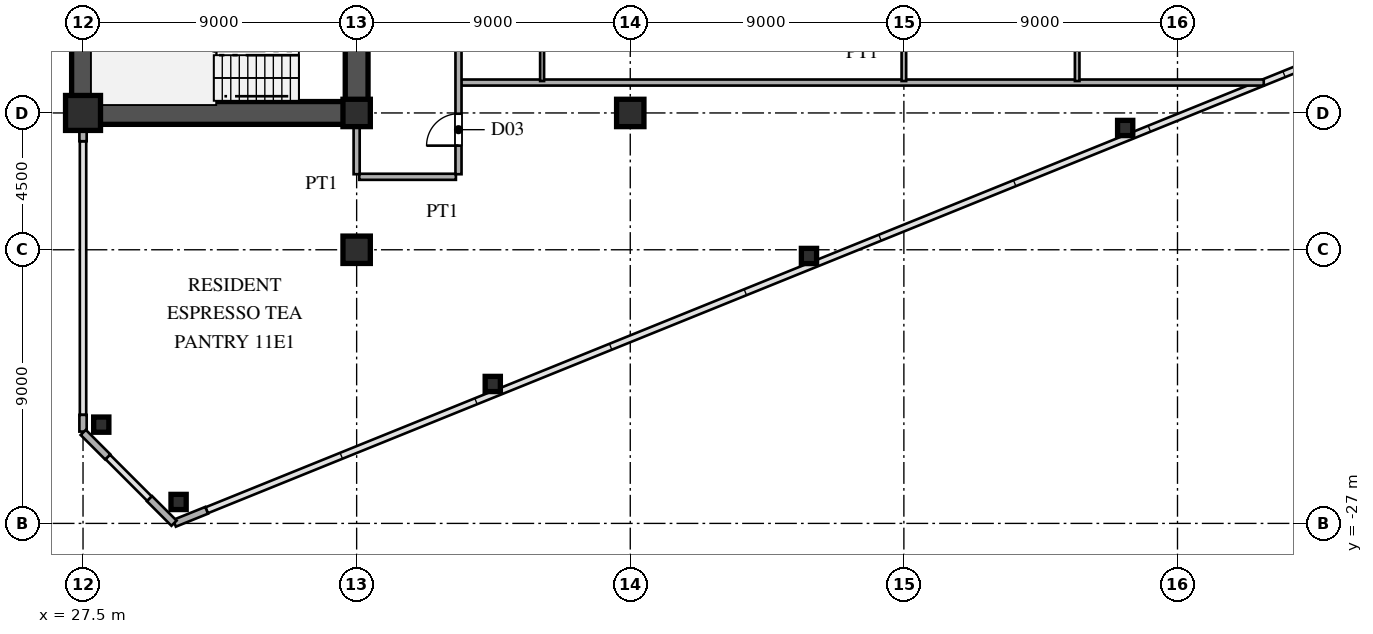
"""IFC4 building model, lengths in metres.
Left out: names, types, materials, properties, quantities, classifications, styles, units other than length and angle.
Written with IfcOpenShell. Run it as: python <this file> out.ifc"""

import sys

from ifc_helpers import new_model, si_unit, direction, frame, frame_2d, origin, origin_2d, place, context, subcontext, project, spatial, rectangle, hollow_rectangle, i_section, extrude, source, transform, mapped, element, fill, save


model = new_model("IFC4")
c1 = context("Model", 3, precision=1e-05, world=origin(), true_north=direction((0.0, 1.0)))
c2 = subcontext(c1, "Body", "Model", "MODEL_VIEW")
j1 = project(units=[si_unit("LENGTHUNIT", "METRE"), si_unit("PLANEANGLEUNIT", "RADIAN")], contexts=[c1])
p1 = place(None, origin())
s1 = spatial("IfcSite", under=j1, at=p1, CompositionType="ELEMENT")
p2 = place(p1, origin())
s2 = spatial("IfcBuilding", under=s1, at=p2, CompositionType="ELEMENT")
p3 = place(p2, frame((0.0, 0.0, 44.1)))
s3 = spatial("IfcBuildingStorey", under=s2, at=p3, CompositionType="ELEMENT", Elevation=44.1)
m1 = source(origin(), c2, "Body", "SweptSolid", [
    extrude(hollow_rectangle(XDim=1.15, YDim=1.15, WallThickness=0.048, at=origin_2d()), origin(), (0.0, 0.0, 1.0), 3.6),
])
p4 = place(p3, frame((27.5, -13.5, 0.0), z_axis=(0.0, 0.0, 1.0), x_axis=(1.0, 0.0, 0.0)))
e1 = element("IfcColumn", 1, at=p4, inside=s3, PredefinedType="COLUMN", context=c2, shape_type="MappedRepresentation", body=[
    mapped(m1, transform((0.0, 0.0, 0.0), scale=1.0)),
])
m2 = source(origin(), c2, "Body", "SweptSolid", [
    extrude(i_section(OverallWidth=0.9, OverallDepth=0.9, WebThickness=0.036, FlangeThickness=0.055, at=origin_2d()), origin(), (0.0, 0.0, 1.0), 3.6),
])
for number, where, z_axis, x_axis in (
    (2, (36.5, -18.0, 0.0), (0.0, 0.0, 1.0), (1.0, 0.0, 0.0)),
    (3, (36.5, -13.5, 0.0), (0.0, 0.0, 1.0), (1.0, 0.0, 0.0)),
    (4, (45.5, -13.5, 0.0), (0.0, 0.0, 1.0), (1.0, 0.0, 0.0)),
):
    element("IfcColumn", number, at=place(p3, frame(where, z_axis=z_axis, x_axis=x_axis)), inside=s3, PredefinedType="COLUMN", context=c2, shape_type="MappedRepresentation", body=[
        mapped(m2, transform((0.0, 0.0, 0.0), scale=1.0)),
    ])
m3 = source(origin(), c2, "Body", "SweptSolid", [
    extrude(hollow_rectangle(XDim=0.5, YDim=0.5, WallThickness=0.02, at=origin_2d()), origin(), (0.0, 0.0, 1.0), 3.6),
])
for number, where, z_axis, x_axis in (
    (5, (30.643, -26.295, 0.0), (0.0, 0.0, 1.0), (1.0, 0.0, 0.0)),
    (6, (28.1, -23.751, 0.0), (0.0, 0.0, 1.0), (1.0, 0.0, 0.0)),
    (7, (40.977, -22.414, 0.0), (0.0, 0.0, 1.0), (1.0, 0.0, 0.0)),
    (8, (51.378, -18.204, 0.0), (0.0, 0.0, 1.0), (1.0, 0.0, 0.0)),
    (9, (61.779, -13.994, 0.0), (0.0, 0.0, 1.0), (1.0, 0.0, 0.0)),
):
    element("IfcColumn", number, at=place(p3, frame(where, z_axis=z_axis, x_axis=x_axis)), inside=s3, PredefinedType="COLUMN", context=c2, shape_type="MappedRepresentation", body=[
        mapped(m3, transform((0.0, 0.0, 0.0), scale=1.0)),
    ])
p5 = place(p3, frame((30.509, -26.996, 0.0), z_axis=(0.0, 0.0, 1.0), x_axis=(0.927007103665, 0.375043770452, 0.0)))
e10 = element("IfcWall", 10, at=p5, inside=s3, PredefinedType="SOLIDWALL", context=c2, shape_type="SweptSolid", body=[
    extrude(rectangle(XDim=1.14, YDim=0.24, at=frame_2d((0.57, 0.0))), origin(), (0.0, 0.0, 1.0), 3.38),
])
p6 = place(p3, frame((27.5, -23.98, 0.0), z_axis=(0.0, 0.0, 1.0), x_axis=(0.0, 1.0, 0.0)))
e11 = element("IfcWall", 11, at=p6, inside=s3, PredefinedType="SOLIDWALL", context=c2, shape_type="SweptSolid", body=[
    extrude(rectangle(XDim=0.55, YDim=0.24, at=frame_2d((0.275, 0.0))), origin(), (0.0, 0.0, 1.0), 3.38),
])
p7 = place(p3, frame((27.5, -14.43, 0.0), z_axis=(0.0, 0.0, 1.0), x_axis=(0.0, 1.0, 0.0)))
e12 = element("IfcWall", 12, at=p7, inside=s3, PredefinedType="SOLIDWALL", context=c2, shape_type="SweptSolid", body=[
    extrude(rectangle(XDim=0.55, YDim=0.24, at=frame_2d((0.275, 0.0))), origin(), (0.0, 0.0, 1.0), 2.88),
])
for number, where, z_axis, x_axis in (
    (13, (27.507, -24.007, 0.0), (0.0, 0.0, 1.0), (0.707, -0.707, 0.0)),
    (14, (29.687, -26.187, 0.0), (0.0, 0.0, 1.0), (0.707, -0.707, 0.0)),
):
    element("IfcWall", number, at=place(p3, frame(where, z_axis=z_axis, x_axis=x_axis)), inside=s3, PredefinedType="SOLIDWALL", context=c2, shape_type="SweptSolid", body=[
        extrude(rectangle(XDim=1.14, YDim=0.24, at=frame_2d((0.57, 0.0))), origin(), (0.0, 0.0, 1.0), 3.38),
    ])
p8 = place(p3, frame((27.5, -13.5, 0.0), z_axis=(0.0, 0.0, 1.0), x_axis=(0.0, 1.0, 0.0)))
e15 = element("IfcWall", 15, at=p8, inside=s3, PredefinedType="SHEAR", context=c2, shape_type="SweptSolid", body=[
    extrude(rectangle(XDim=12.2, YDim=0.75, at=frame_2d((6.1, 0.0))), origin(), (0.0, 0.0, 1.0), 3.38),
])
p9 = place(p3, frame((27.5, -13.5, 0.0), z_axis=(0.0, 0.0, 1.0), x_axis=(1.0, 0.0, 0.0)))
e16 = element("IfcWall", 16, at=p9, inside=s3, PredefinedType="SHEAR", context=c2, shape_type="SweptSolid", body=[
    extrude(rectangle(XDim=9.0, YDim=0.75, at=frame_2d((4.5, 0.0))), origin(), (0.0, 0.0, 1.0), 3.38),
])
p10 = place(p3, frame((36.5, -13.65, 0.0), z_axis=(0.0, 0.0, 1.0), x_axis=(0.0, 1.0, 0.0)))
e17 = element("IfcWall", 17, at=p10, inside=s3, PredefinedType="SHEAR", context=c2, shape_type="SweptSolid", body=[
    extrude(rectangle(XDim=7.15, YDim=0.75, at=frame_2d((3.575, 0.0))), origin(), (0.0, 0.0, 1.0), 3.38),
])
p11 = place(p10, frame((4.675, 0.0, 0.0)))
e18 = element("IfcOpeningElement", 18, at=p11, cuts=e17, PredefinedType="OPENING", context=c2, shape_type="SweptSolid", body=[
    extrude(rectangle(XDim=1.15, YDim=2.2, at=frame_2d((0.575, 1.1))), frame((0.0, 0.385, 0.0), z_axis=(0.0, -1.0, 0.0), x_axis=(1.0, 0.0, 0.0)), (0.0, 0.0, 1.0), 0.77),
])
p12 = place(p3, frame((36.585, -15.6, 0.0), z_axis=(0.0, 0.0, 1.0), x_axis=(1.0, 0.0, 0.0)))
e19 = element("IfcWall", 19, at=p12, inside=s3, PredefinedType="PARTITIONING", context=c2, shape_type="SweptSolid", body=[
    extrude(rectangle(XDim=3.18, YDim=0.2, at=frame_2d((1.59, 0.0))), origin(), (0.0, 0.0, 1.0), 3.38),
])
p13 = place(p3, frame((39.93, -12.5, 0.0), z_axis=(0.0, 0.0, 1.0), x_axis=(1.0, 0.0, 0.0)))
e20 = element("IfcWall", 20, at=p13, inside=s3, PredefinedType="PARTITIONING", context=c2, shape_type="SweptSolid", body=[
    extrude(rectangle(XDim=26.407, YDim=0.2, at=frame_2d((13.204, 0.0))), origin(), (0.0, 0.0, 1.0), 3.38),
])
p14 = place(p3, frame((36.5, -15.515, 0.0), z_axis=(0.0, 0.0, 1.0), x_axis=(0.0, 1.0, 0.0)))
e21 = element("IfcWall", 21, at=p14, inside=s3, PredefinedType="PARTITIONING", context=c2, shape_type="SweptSolid", body=[
    extrude(rectangle(XDim=1.635, YDim=0.2, at=frame_2d((0.817, 0.0))), origin(), (0.0, 0.0, 1.0), 2.68),
])
p15 = place(p3, frame((39.85, -15.515, 0.0), z_axis=(0.0, 0.0, 1.0), x_axis=(0.0, 1.0, 0.0)))
e22 = element("IfcWall", 22, at=p15, inside=s3, PredefinedType="PARTITIONING", context=c2, shape_type="SweptSolid", body=[
    extrude(rectangle(XDim=31.03, YDim=0.2, at=frame_2d((15.515, 0.0))), origin(), (0.0, 0.0, 1.0), 3.38),
])
p16 = place(p15, frame((0.94, 0.0, 0.0)))
e23 = element("IfcOpeningElement", 23, at=p16, cuts=e22, PredefinedType="OPENING", context=c2, shape_type="SweptSolid", body=[
    extrude(rectangle(XDim=1.05, YDim=2.25, at=frame_2d((0.525, 1.125))), frame((0.0, 0.11, 0.0), z_axis=(0.0, -1.0, 0.0), x_axis=(1.0, 0.0, 0.0)), (0.0, 0.0, 1.0), 0.22),
])
p17 = place(p15, frame((9.28, 0.0, 0.0)))
e24 = element("IfcOpeningElement", 24, at=p17, cuts=e22, PredefinedType="OPENING", context=c2, shape_type="SweptSolid", body=[
    extrude(rectangle(XDim=1.05, YDim=2.25, at=frame_2d((0.525, 1.125))), frame((0.0, 0.11, 0.0), z_axis=(0.0, -1.0, 0.0), x_axis=(1.0, 0.0, 0.0)), (0.0, 0.0, 1.0), 0.22),
])
p18 = place(p15, frame((21.825, 0.0, 0.0)))
e25 = element("IfcOpeningElement", 25, at=p18, cuts=e22, PredefinedType="OPENING", context=c2, shape_type="SweptSolid", body=[
    extrude(rectangle(XDim=1.05, YDim=2.25, at=frame_2d((0.525, 1.125))), frame((0.0, 0.11, 0.0), z_axis=(0.0, -1.0, 0.0), x_axis=(1.0, 0.0, 0.0)), (0.0, 0.0, 1.0), 0.22),
])
p19 = place(p15, frame((29.04, 0.0, 0.0)))
e26 = element("IfcOpeningElement", 26, at=p19, cuts=e22, PredefinedType="OPENING", context=c2, shape_type="SweptSolid", body=[
    extrude(rectangle(XDim=1.05, YDim=2.25, at=frame_2d((0.525, 1.125))), frame((0.0, 0.11, 0.0), z_axis=(0.0, -1.0, 0.0), x_axis=(1.0, 0.0, 0.0)), (0.0, 0.0, 1.0), 0.22),
])
p20 = place(p3, frame((42.6, -12.45, 0.0), z_axis=(0.0, 0.0, 1.0), x_axis=(0.0, 1.0, 0.0)))
e27 = element("IfcWall", 27, at=p20, inside=s3, PredefinedType="PARTITIONING", context=c2, shape_type="SweptSolid", body=[
    extrude(rectangle(XDim=9.233, YDim=0.13, at=frame_2d((4.616, 0.0))), origin(), (0.0, 0.0, 1.0), 3.38),
])
p21 = place(p20, frame((6.475, 0.0, 0.0)))
e28 = element("IfcOpeningElement", 28, at=p21, cuts=e27, PredefinedType="OPENING", context=c2, shape_type="SweptSolid", body=[
    extrude(rectangle(XDim=0.95, YDim=2.15, at=frame_2d((0.475, 1.075))), frame((0.0, 0.075, 0.0), z_axis=(0.0, -1.0, 0.0), x_axis=(1.0, 0.0, 0.0)), (0.0, 0.0, 1.0), 0.15),
])
p22 = place(p3, frame((54.5, -12.45, 0.0), z_axis=(0.0, 0.0, 1.0), x_axis=(0.0, 1.0, 0.0)))
e29 = element("IfcWall", 29, at=p22, inside=s3, PredefinedType="PARTITIONING", context=c2, shape_type="SweptSolid", body=[
    extrude(rectangle(XDim=24.9, YDim=0.15, at=frame_2d((12.45, 0.0))), origin(), (0.0, 0.0, 1.0), 2.68),
])
p23 = place(p22, frame((6.475, 0.0, 0.0)))
e30 = element("IfcOpeningElement", 30, at=p23, cuts=e29, PredefinedType="OPENING", context=c2, shape_type="SweptSolid", body=[
    extrude(rectangle(XDim=0.95, YDim=2.15, at=frame_2d((0.475, 1.075))), frame((0.0, 0.085, 0.0), z_axis=(0.0, -1.0, 0.0), x_axis=(1.0, 0.0, 0.0)), (0.0, 0.0, 1.0), 0.17),
])
p24 = place(p22, frame((18.975, 0.0, 0.0)))
e31 = element("IfcOpeningElement", 31, at=p24, cuts=e29, PredefinedType="OPENING", context=c2, shape_type="SweptSolid", body=[
    extrude(rectangle(XDim=0.95, YDim=2.15, at=frame_2d((0.475, 1.075))), frame((0.0, 0.085, 0.0), z_axis=(0.0, -1.0, 0.0), x_axis=(1.0, 0.0, 0.0)), (0.0, 0.0, 1.0), 0.17),
])
p25 = place(p3, frame((60.2, -12.45, 0.0), z_axis=(0.0, 0.0, 1.0), x_axis=(0.0, 1.0, 0.0)))
e32 = element("IfcWall", 32, at=p25, inside=s3, PredefinedType="PARTITIONING", context=c2, shape_type="SweptSolid", body=[
    extrude(rectangle(XDim=24.9, YDim=0.15, at=frame_2d((12.45, 0.0))), origin(), (0.0, 0.0, 1.0), 3.38),
])
p26 = place(p25, frame((1.808, 0.0, 0.0)))
e33 = element("IfcOpeningElement", 33, at=p26, cuts=e32, PredefinedType="OPENING", context=c2, shape_type="SweptSolid", body=[
    extrude(rectangle(XDim=0.95, YDim=2.15, at=frame_2d((0.475, 1.075))), frame((0.0, 0.085, 0.0), z_axis=(0.0, -1.0, 0.0), x_axis=(1.0, 0.0, 0.0)), (0.0, 0.0, 1.0), 0.17),
])
p27 = place(p25, frame((6.475, 0.0, 0.0)))
e34 = element("IfcOpeningElement", 34, at=p27, cuts=e32, PredefinedType="OPENING", context=c2, shape_type="SweptSolid", body=[
    extrude(rectangle(XDim=0.95, YDim=2.15, at=frame_2d((0.475, 1.075))), frame((0.0, 0.085, 0.0), z_axis=(0.0, -1.0, 0.0), x_axis=(1.0, 0.0, 0.0)), (0.0, 0.0, 1.0), 0.17),
])
p28 = place(p25, frame((11.142, 0.0, 0.0)))
e35 = element("IfcOpeningElement", 35, at=p28, cuts=e32, PredefinedType="OPENING", context=c2, shape_type="SweptSolid", body=[
    extrude(rectangle(XDim=0.95, YDim=2.15, at=frame_2d((0.475, 1.075))), frame((0.0, 0.085, 0.0), z_axis=(0.0, -1.0, 0.0), x_axis=(1.0, 0.0, 0.0)), (0.0, 0.0, 1.0), 0.17),
])
p29 = place(p25, frame((15.308, 0.0, 0.0)))
e36 = element("IfcOpeningElement", 36, at=p29, cuts=e32, PredefinedType="OPENING", context=c2, shape_type="SweptSolid", body=[
    extrude(rectangle(XDim=0.95, YDim=2.15, at=frame_2d((0.475, 1.075))), frame((0.0, 0.085, 0.0), z_axis=(0.0, -1.0, 0.0), x_axis=(1.0, 0.0, 0.0)), (0.0, 0.0, 1.0), 0.17),
])
p30 = place(p25, frame((18.975, 0.0, 0.0)))
e37 = element("IfcOpeningElement", 37, at=p30, cuts=e32, PredefinedType="OPENING", context=c2, shape_type="SweptSolid", body=[
    extrude(rectangle(XDim=0.95, YDim=2.15, at=frame_2d((0.475, 1.075))), frame((0.0, 0.085, 0.0), z_axis=(0.0, -1.0, 0.0), x_axis=(1.0, 0.0, 0.0)), (0.0, 0.0, 1.0), 0.17),
])
m4 = source(origin(), c2, "Body", "SweptSolid", [
    extrude(rectangle(XDim=1.05, YDim=2.25, at=frame_2d((0.525, 1.125))), frame((0.0, 0.025, 0.0), z_axis=(0.0, -1.0, 0.0), x_axis=(1.0, 0.0, 0.0)), (0.0, 0.0, 1.0), 0.05),
])
p31 = place(p16, origin())
e38 = element("IfcDoor", 38, at=p31, inside=s3, OperationType="SINGLE_SWING_LEFT", PredefinedType="DOOR", context=c2, shape_type="MappedRepresentation", body=[
    mapped(m4, transform((0.0, 0.0, 0.0), scale=1.0)),
])
fill(e23, e38)
save(model, sys.argv[1])
